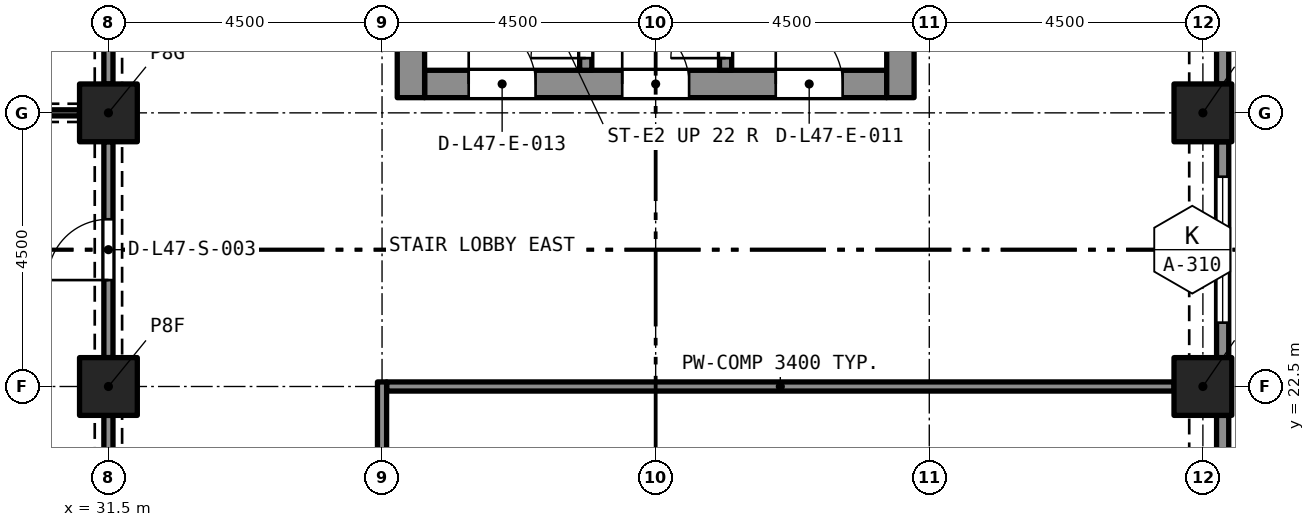
"""IFC4 building model, lengths in metres.
Left out: names, types, materials, properties, quantities, classifications, styles, units other than length and angle.
Written with IfcOpenShell. Run it as: python <this file> out.ifc"""

import sys

from ifc_helpers import new_model, si_unit, direction, frame, frame_2d, origin, origin_2d, place, context, subcontext, project, spatial, rectangle, extrude, element, fill, save


model = new_model("IFC4")
c1 = context("Model", 3, precision=1e-05, world=origin(), true_north=direction((0.0, 1.0)))
c2 = subcontext(c1, "Body", "Model", "MODEL_VIEW")
j1 = project(units=[si_unit("LENGTHUNIT", "METRE"), si_unit("PLANEANGLEUNIT", "RADIAN")], contexts=[c1])
p1 = place(None, origin())
s1 = spatial("IfcSite", under=j1, at=p1, CompositionType="ELEMENT")
p2 = place(p1, origin())
s2 = spatial("IfcBuilding", under=s1, at=p2, CompositionType="ELEMENT")
p3 = place(p2, frame((0.0, 0.0, 172.6)))
s3 = spatial("IfcBuildingStorey", under=s2, at=p3, CompositionType="ELEMENT", Elevation=172.6)
for number, where, z_axis, x_axis in (
    (1, (31.5, 22.5, 0.0), (0.0, 0.0, 1.0), (1.0, 0.0, 0.0)),
    (2, (49.5, 22.5, 0.0), (0.0, 0.0, 1.0), (1.0, 0.0, 0.0)),
    (3, (31.5, 27.0, 0.0), (0.0, 0.0, 1.0), (1.0, 0.0, 0.0)),
    (4, (49.5, 27.0, 0.0), (0.0, 0.0, 1.0), (1.0, 0.0, 0.0)),
):
    element("IfcColumn", number, at=place(p3, frame(where, z_axis=z_axis, x_axis=x_axis)), inside=s3, PredefinedType="COLUMN", context=c2, shape_type="SweptSolid", body=[
        extrude(rectangle(XDim=0.95, YDim=0.95, at=origin_2d()), origin(), (0.0, 0.0, 1.0), 3.7),
    ])
p4 = place(p3, frame((36.7, 27.475, 0.0), z_axis=(0.0, 0.0, 1.0), x_axis=(1.0, 0.0, 0.0)))
e5 = element("IfcWall", 5, at=p4, inside=s3, PredefinedType="SOLIDWALL", context=c2, shape_type="SweptSolid", body=[
    extrude(rectangle(XDim=7.6, YDim=0.45, at=frame_2d((3.8, 0.0))), origin(), (0.0, 0.0, 1.0), 3.7),
])
p5 = place(p4, frame((5.775, 0.0, 0.0)))
e6 = element("IfcOpeningElement", 6, at=p5, cuts=e5, PredefinedType="OPENING", context=c2, shape_type="SweptSolid", body=[
    extrude(rectangle(XDim=1.1, YDim=2.1, at=frame_2d((0.55, 1.05))), frame((0.0, 0.235, 0.0), z_axis=(0.0, -1.0, 0.0), x_axis=(1.0, 0.0, 0.0)), (0.0, 0.0, 1.0), 0.47),
])
p6 = place(p4, frame((3.25, 0.0, 0.0)))
e7 = element("IfcOpeningElement", 7, at=p6, cuts=e5, PredefinedType="OPENING", context=c2, shape_type="SweptSolid", body=[
    extrude(rectangle(XDim=1.1, YDim=2.1, at=frame_2d((0.55, 1.05))), frame((0.0, 0.235, 0.0), z_axis=(0.0, -1.0, 0.0), x_axis=(1.0, 0.0, 0.0)), (0.0, 0.0, 1.0), 0.47),
])
p7 = place(p4, frame((0.725, 0.0, 0.0)))
e8 = element("IfcOpeningElement", 8, at=p7, cuts=e5, PredefinedType="OPENING", context=c2, shape_type="SweptSolid", body=[
    extrude(rectangle(XDim=1.1, YDim=2.1, at=frame_2d((0.55, 1.05))), frame((0.0, 0.235, 0.0), z_axis=(0.0, -1.0, 0.0), x_axis=(1.0, 0.0, 0.0)), (0.0, 0.0, 1.0), 0.47),
])
p8 = place(p3, frame((36.475, 27.25, 0.0), z_axis=(0.0, 0.0, 1.0), x_axis=(0.0, 1.0, 0.0)))
e9 = element("IfcWall", 9, at=p8, inside=s3, PredefinedType="SOLIDWALL", context=c2, shape_type="SweptSolid", body=[
    extrude(rectangle(XDim=13.0, YDim=0.45, at=frame_2d((6.5, 0.0))), origin(), (0.0, 0.0, 1.0), 3.7),
])
p9 = place(p8, frame((8.7, 0.0, 0.0)))
e10 = element("IfcOpeningElement", 10, at=p9, cuts=e9, PredefinedType="OPENING", context=c2, shape_type="SweptSolid", body=[
    extrude(rectangle(XDim=1.2, YDim=2.1, at=frame_2d((0.6, 1.05))), frame((0.0, 0.235, 0.0), z_axis=(0.0, -1.0, 0.0), x_axis=(1.0, 0.0, 0.0)), (0.0, 0.0, 1.0), 0.47),
])
p10 = place(p3, frame((44.525, 27.25, 0.0), z_axis=(0.0, 0.0, 1.0), x_axis=(0.0, 1.0, 0.0)))
e11 = element("IfcWall", 11, at=p10, inside=s3, PredefinedType="SOLIDWALL", context=c2, shape_type="SweptSolid", body=[
    extrude(rectangle(XDim=13.0, YDim=0.45, at=frame_2d((6.5, 0.0))), origin(), (0.0, 0.0, 1.0), 3.7),
])
p11 = place(p10, frame((8.7, 0.0, 0.0)))
e12 = element("IfcOpeningElement", 12, at=p11, cuts=e11, PredefinedType="OPENING", context=c2, shape_type="SweptSolid", body=[
    extrude(rectangle(XDim=1.2, YDim=2.1, at=frame_2d((0.6, 1.05))), frame((0.0, 0.235, 0.0), z_axis=(0.0, -1.0, 0.0), x_axis=(1.0, 0.0, 0.0)), (0.0, 0.0, 1.0), 0.47),
])
p12 = place(p3, frame((49.825, 22.025, 0.0), z_axis=(0.0, 0.0, 1.0), x_axis=(0.0, -1.0, 0.0)))
e13 = element("IfcWall", 13, at=p12, inside=s3, PredefinedType="SOLIDWALL", context=c2, shape_type="SweptSolid", body=[
    extrude(rectangle(XDim=3.55, YDim=0.2, at=frame_2d((1.775, 0.0))), origin(), (0.0, 0.0, 1.0), 3.7),
])
p13 = place(p12, frame((0.575, 0.0, 0.45)))
e14 = element("IfcOpeningElement", 14, at=p13, cuts=e13, PredefinedType="OPENING", context=c2, shape_type="SweptSolid", body=[
    extrude(rectangle(XDim=2.4, YDim=1.95, at=frame_2d((1.2, 0.975))), frame((0.0, 0.11, 0.0), z_axis=(0.0, -1.0, 0.0), x_axis=(1.0, 0.0, 0.0)), (0.0, 0.0, 1.0), 0.22),
])
p14 = place(p3, frame((49.825, 26.525, 0.0), z_axis=(0.0, 0.0, 1.0), x_axis=(0.0, -1.0, 0.0)))
e15 = element("IfcWall", 15, at=p14, inside=s3, PredefinedType="SOLIDWALL", context=c2, shape_type="SweptSolid", body=[
    extrude(rectangle(XDim=3.55, YDim=0.2, at=frame_2d((1.775, 0.0))), origin(), (0.0, 0.0, 1.0), 3.7),
])
p15 = place(p14, frame((0.575, 0.0, 0.45)))
e16 = element("IfcOpeningElement", 16, at=p15, cuts=e15, PredefinedType="OPENING", context=c2, shape_type="SweptSolid", body=[
    extrude(rectangle(XDim=2.4, YDim=1.95, at=frame_2d((1.2, 0.975))), frame((0.0, 0.11, 0.0), z_axis=(0.0, -1.0, 0.0), x_axis=(1.0, 0.0, 0.0)), (0.0, 0.0, 1.0), 0.22),
])
p16 = place(p3, frame((49.825, 31.025, 0.0), z_axis=(0.0, 0.0, 1.0), x_axis=(0.0, -1.0, 0.0)))
e17 = element("IfcWall", 17, at=p16, inside=s3, PredefinedType="SOLIDWALL", context=c2, shape_type="SweptSolid", body=[
    extrude(rectangle(XDim=3.55, YDim=0.2, at=frame_2d((1.775, 0.0))), origin(), (0.0, 0.0, 1.0), 3.7),
])
p17 = place(p16, frame((0.575, 0.0, 0.45)))
e18 = element("IfcOpeningElement", 18, at=p17, cuts=e17, PredefinedType="OPENING", context=c2, shape_type="SweptSolid", body=[
    extrude(rectangle(XDim=2.4, YDim=1.95, at=frame_2d((1.2, 0.975))), frame((0.0, 0.11, 0.0), z_axis=(0.0, -1.0, 0.0), x_axis=(1.0, 0.0, 0.0)), (0.0, 0.0, 1.0), 0.22),
])
p18 = place(p3, frame((41.65, 27.7, 0.0), z_axis=(0.0, 0.0, 1.0), x_axis=(0.0, 1.0, 0.0)))
e19 = element("IfcWall", 19, at=p18, inside=s3, PredefinedType="SOLIDWALL", context=c2, shape_type="SweptSolid", body=[
    extrude(rectangle(XDim=5.4, YDim=0.2, at=frame_2d((2.7, 0.0))), origin(), (0.0, 0.0, 1.0), 3.4),
])
p19 = place(p18, frame((0.2, 0.0, 0.0)))
e20 = element("IfcOpeningElement", 20, at=p19, cuts=e19, PredefinedType="OPENING", context=c2, shape_type="SweptSolid", body=[
    extrude(rectangle(XDim=0.9, YDim=2.1, at=frame_2d((0.45, 1.05))), frame((0.0, 0.11, 0.0), z_axis=(0.0, -1.0, 0.0), x_axis=(1.0, 0.0, 0.0)), (0.0, 0.0, 1.0), 0.22),
])
p20 = place(p3, frame((39.35, 27.7, 0.0), z_axis=(0.0, 0.0, 1.0), x_axis=(0.0, 1.0, 0.0)))
e21 = element("IfcWall", 21, at=p20, inside=s3, PredefinedType="SOLIDWALL", context=c2, shape_type="SweptSolid", body=[
    extrude(rectangle(XDim=5.4, YDim=0.2, at=frame_2d((2.7, 0.0))), origin(), (0.0, 0.0, 1.0), 3.4),
])
p21 = place(p20, frame((0.2, 0.0, 0.0)))
e22 = element("IfcOpeningElement", 22, at=p21, cuts=e21, PredefinedType="OPENING", context=c2, shape_type="SweptSolid", body=[
    extrude(rectangle(XDim=0.9, YDim=2.1, at=frame_2d((0.45, 1.05))), frame((0.0, 0.11, 0.0), z_axis=(0.0, -1.0, 0.0), x_axis=(1.0, 0.0, 0.0)), (0.0, 0.0, 1.0), 0.22),
])
p22 = place(p3, frame((18.475, 27.0, 0.0), z_axis=(0.0, 0.0, 1.0), x_axis=(1.0, 0.0, 0.0)))
e23 = element("IfcWall", 23, at=p22, inside=s3, PredefinedType="PARTITIONING", context=c2, shape_type="SweptSolid", body=[
    extrude(rectangle(XDim=12.55, YDim=0.1, at=frame_2d((6.275, 0.0))), origin(), (0.0, 0.0, 1.0), 3.25),
])
p23 = place(p3, frame((31.5, 22.975, 0.0), z_axis=(0.0, 0.0, 1.0), x_axis=(0.0, 1.0, 0.0)))
e24 = element("IfcWall", 24, at=p23, inside=s3, PredefinedType="PARTITIONING", context=c2, shape_type="SweptSolid", body=[
    extrude(rectangle(XDim=3.55, YDim=0.15, at=frame_2d((1.775, 0.0))), origin(), (0.0, 0.0, 1.0), 2.88),
])
p24 = place(p23, frame((1.275, 0.0, 0.0)))
e25 = element("IfcOpeningElement", 25, at=p24, cuts=e24, PredefinedType="OPENING", context=c2, shape_type="SweptSolid", body=[
    extrude(rectangle(XDim=1.0, YDim=2.1, at=frame_2d((0.5, 1.05))), frame((0.0, 0.085, 0.0), z_axis=(0.0, -1.0, 0.0), x_axis=(1.0, 0.0, 0.0)), (0.0, 0.0, 1.0), 0.17),
])
for number, where, z_axis, x_axis in (
    (26, (31.5, 18.475, 0.0), (0.0, 0.0, 1.0), (0.0, 1.0, 0.0)),
    (27, (31.5, 27.475, 0.0), (0.0, 0.0, 1.0), (0.0, 1.0, 0.0)),
):
    element("IfcWall", number, at=place(p3, frame(where, z_axis=z_axis, x_axis=x_axis)), inside=s3, PredefinedType="PARTITIONING", context=c2, shape_type="SweptSolid", body=[
        extrude(rectangle(XDim=3.55, YDim=0.15, at=frame_2d((1.775, 0.0))), origin(), (0.0, 0.0, 1.0), 2.88),
    ])
p25 = place(p3, frame((36.075, 22.5, 0.0), z_axis=(0.0, 0.0, 1.0), x_axis=(1.0, 0.0, 0.0)))
e28 = element("IfcWall", 28, at=p25, inside=s3, PredefinedType="PARTITIONING", context=c2, shape_type="SweptSolid", body=[
    extrude(rectangle(XDim=12.95, YDim=0.15, at=frame_2d((6.475, 0.0))), origin(), (0.0, 0.0, 1.0), 3.4),
])
p26 = place(p3, frame((36.0, 22.575, 0.0), z_axis=(0.0, 0.0, 1.0), x_axis=(0.0, -1.0, 0.0)))
e29 = element("IfcWall", 29, at=p26, inside=s3, PredefinedType="PARTITIONING", context=c2, shape_type="SweptSolid", body=[
    extrude(rectangle(XDim=9.075, YDim=0.15, at=frame_2d((4.538, 0.0))), origin(), (0.0, 0.0, 1.0), 3.4),
])
p27 = place(p26, frame((4.075, 0.0, 0.0)))
e30 = element("IfcOpeningElement", 30, at=p27, cuts=e29, PredefinedType="OPENING", context=c2, shape_type="SweptSolid", body=[
    extrude(rectangle(XDim=1.0, YDim=2.1, at=frame_2d((0.5, 1.05))), frame((0.0, 0.085, 0.0), z_axis=(0.0, -1.0, 0.0), x_axis=(1.0, 0.0, 0.0)), (0.0, 0.0, 1.0), 0.17),
])
p28 = place(p15, origin())
e31 = element("IfcWindow", 31, at=p28, inside=s3, PartitioningType="SINGLE_PANEL", PredefinedType="WINDOW", context=c2, shape_type="SweptSolid", body=[
    extrude(rectangle(XDim=2.4, YDim=1.95, at=frame_2d((1.2, 0.975))), frame((0.0, 0.03, 0.0), z_axis=(0.0, -1.0, 0.0), x_axis=(1.0, 0.0, 0.0)), (0.0, 0.0, 1.0), 0.06),
])
fill(e16, e31)
p29 = place(p19, origin())
e32 = element("IfcDoor", 32, at=p29, inside=s3, OperationType="SINGLE_SWING_LEFT", PredefinedType="DOOR", context=c2, shape_type="SweptSolid", body=[
    extrude(rectangle(XDim=0.9, YDim=2.1, at=frame_2d((0.45, 1.05))), frame((0.0, 0.025, 0.0), z_axis=(0.0, -1.0, 0.0), x_axis=(1.0, 0.0, 0.0)), (0.0, 0.0, 1.0), 0.05),
])
fill(e20, e32)
p30 = place(p21, origin())
e33 = element("IfcDoor", 33, at=p30, inside=s3, OperationType="SINGLE_SWING_LEFT", PredefinedType="DOOR", context=c2, shape_type="SweptSolid", body=[
    extrude(rectangle(XDim=0.9, YDim=2.1, at=frame_2d((0.45, 1.05))), frame((0.0, 0.025, 0.0), z_axis=(0.0, -1.0, 0.0), x_axis=(1.0, 0.0, 0.0)), (0.0, 0.0, 1.0), 0.05),
])
fill(e22, e33)
p31 = place(p5, origin())
e34 = element("IfcDoor", 34, at=p31, inside=s3, OperationType="SINGLE_SWING_LEFT", PredefinedType="DOOR", context=c2, shape_type="SweptSolid", body=[
    extrude(rectangle(XDim=1.1, YDim=2.1, at=frame_2d((0.55, 1.05))), frame((0.0, 0.025, 0.0), z_axis=(0.0, -1.0, 0.0), x_axis=(1.0, 0.0, 0.0)), (0.0, 0.0, 1.0), 0.05),
])
fill(e6, e34)
p32 = place(p6, origin())
e35 = element("IfcDoor", 35, at=p32, inside=s3, OperationType="SINGLE_SWING_LEFT", PredefinedType="DOOR", context=c2, shape_type="SweptSolid", body=[
    extrude(rectangle(XDim=1.1, YDim=2.1, at=frame_2d((0.55, 1.05))), frame((0.0, 0.025, 0.0), z_axis=(0.0, -1.0, 0.0), x_axis=(1.0, 0.0, 0.0)), (0.0, 0.0, 1.0), 0.05),
])
fill(e7, e35)
p33 = place(p7, origin())
e36 = element("IfcDoor", 36, at=p33, inside=s3, OperationType="SINGLE_SWING_LEFT", PredefinedType="DOOR", context=c2, shape_type="SweptSolid", body=[
    extrude(rectangle(XDim=1.1, YDim=2.1, at=frame_2d((0.55, 1.05))), frame((0.0, 0.025, 0.0), z_axis=(0.0, -1.0, 0.0), x_axis=(1.0, 0.0, 0.0)), (0.0, 0.0, 1.0), 0.05),
])
fill(e8, e36)
p34 = place(p24, origin())
e37 = element("IfcDoor", 37, at=p34, inside=s3, OperationType="SINGLE_SWING_RIGHT", PredefinedType="DOOR", context=c2, shape_type="SweptSolid", body=[
    extrude(rectangle(XDim=1.0, YDim=2.1, at=frame_2d((0.5, 1.05))), frame((0.0, 0.025, 0.0), z_axis=(0.0, -1.0, 0.0), x_axis=(1.0, 0.0, 0.0)), (0.0, 0.0, 1.0), 0.05),
])
fill(e25, e37)
save(model, sys.argv[1])
